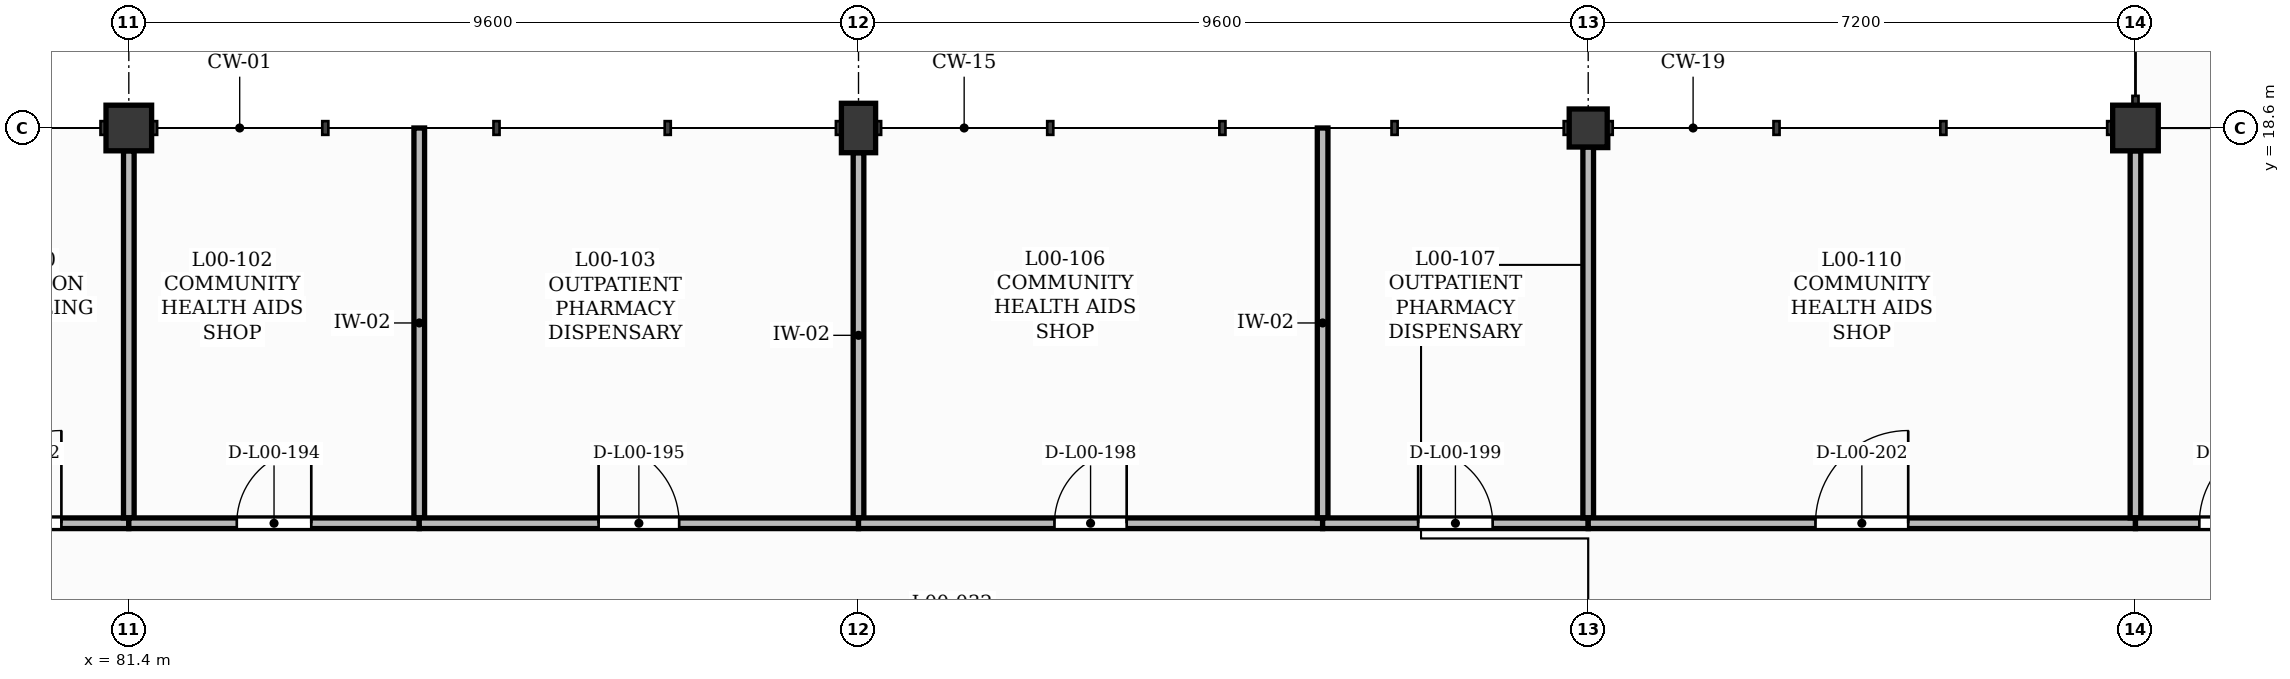
"""IFC4 building model, lengths in metres.
Left out: names, types, materials, properties, quantities, classifications, styles, units other than length and angle.
Written with IfcOpenShell. Run it as: python <this file> out.ifc"""

import sys

from ifc_helpers import new_model, si_unit, direction, frame, frame_2d, origin, origin_2d, place, context, subcontext, project, spatial, rectangle, extrude, element, fill, save


model = new_model("IFC4")
c1 = context("Model", 3, precision=1e-05, world=origin(), true_north=direction((0.0, 1.0)))
c2 = subcontext(c1, "Body", "Model", "MODEL_VIEW")
j1 = project(units=[si_unit("LENGTHUNIT", "METRE"), si_unit("PLANEANGLEUNIT", "RADIAN")], contexts=[c1])
p1 = place(None, origin())
s1 = spatial("IfcSite", under=j1, at=p1, CompositionType="ELEMENT")
p2 = place(p1, origin())
s2 = spatial("IfcBuilding", under=s1, at=p2, CompositionType="ELEMENT")
p3 = place(p2, origin())
s3 = spatial("IfcBuildingStorey", under=s2, at=p3, CompositionType="ELEMENT", Elevation=0.0)
p4 = place(p3, frame((81.4, 18.6, 0.0), z_axis=(0.0, 0.0, 1.0), x_axis=(1.0, 0.0, 0.0)))
e1 = element("IfcColumn", 1, at=p4, inside=s3, PredefinedType="COLUMN", context=c2, shape_type="SweptSolid", body=[
    extrude(rectangle(XDim=0.6, YDim=0.6, at=origin_2d()), origin(), (0.0, 0.0, 1.0), 4.2),
])
p5 = place(p3, frame((91.0, 18.6, 0.0), z_axis=(0.0, 0.0, 1.0), x_axis=(1.0, 0.0, 0.0)))
e2 = element("IfcColumn", 2, at=p5, inside=s3, PredefinedType="COLUMN", context=c2, shape_type="SweptSolid", body=[
    extrude(rectangle(XDim=0.45, YDim=0.65, at=origin_2d()), origin(), (0.0, 0.0, 1.0), 4.2),
])
p6 = place(p3, frame((100.6, 18.6, 0.0), z_axis=(0.0, 0.0, 1.0), x_axis=(1.0, 0.0, 0.0)))
e3 = element("IfcColumn", 3, at=p6, inside=s3, PredefinedType="COLUMN", context=c2, shape_type="SweptSolid", body=[
    extrude(rectangle(XDim=0.5, YDim=0.5, at=origin_2d()), origin(), (0.0, 0.0, 1.0), 4.2),
])
p7 = place(p3, frame((107.8, 18.6, 0.0), z_axis=(0.0, 0.0, 1.0), x_axis=(1.0, 0.0, 0.0)))
e4 = element("IfcColumn", 4, at=p7, inside=s3, PredefinedType="COLUMN", context=c2, shape_type="SweptSolid", body=[
    extrude(rectangle(XDim=0.6, YDim=0.6, at=origin_2d()), origin(), (0.0, 0.0, 1.0), 4.2),
])
p8 = place(p3, frame((78.406, 13.4, 0.0), z_axis=(0.0, 0.0, 1.0), x_axis=(1.0, 0.0, 0.0)))
e5 = element("IfcWall", 5, at=p8, inside=s3, PredefinedType="PARTITIONING", context=c2, shape_type="SweptSolid", body=[
    extrude(rectangle(XDim=2.994, YDim=0.14, at=frame_2d((1.497, 0.0))), origin(), (0.0, 0.0, 1.0), 4.18),
])
p9 = place(p8, frame((0.887, 0.0, 0.0)))
e6 = element("IfcOpeningElement", 6, at=p9, cuts=e5, PredefinedType="OPENING", context=c2, shape_type="SweptSolid", body=[
    extrude(rectangle(XDim=1.22, YDim=2.1, at=frame_2d((0.61, 1.05))), frame((0.0, 0.08, 0.0), z_axis=(0.0, -1.0, 0.0), x_axis=(1.0, 0.0, 0.0)), (0.0, 0.0, 1.0), 0.16),
])
p10 = place(p3, frame((81.4, 13.47, 0.0), z_axis=(0.0, 0.0, 1.0), x_axis=(0.0, 1.0, 0.0)))
e7 = element("IfcWall", 7, at=p10, inside=s3, PredefinedType="PARTITIONING", context=c2, shape_type="SweptSolid", body=[
    extrude(rectangle(XDim=4.83, YDim=0.14, at=frame_2d((2.415, 0.0))), origin(), (0.0, 0.0, 1.0), 3.5),
])
p11 = place(p3, frame((81.4, 13.4, 0.0), z_axis=(0.0, 0.0, 1.0), x_axis=(1.0, 0.0, 0.0)))
e8 = element("IfcWall", 8, at=p11, inside=s3, PredefinedType="PARTITIONING", context=c2, shape_type="SweptSolid", body=[
    extrude(rectangle(XDim=3.821, YDim=0.14, at=frame_2d((1.911, 0.0))), origin(), (0.0, 0.0, 1.0), 4.18),
])
p12 = place(p11, frame((1.42, 0.0, 0.0)))
e9 = element("IfcOpeningElement", 9, at=p12, cuts=e8, PredefinedType="OPENING", context=c2, shape_type="SweptSolid", body=[
    extrude(rectangle(XDim=0.98, YDim=2.15, at=frame_2d((0.49, 1.075))), frame((0.0, 0.08, 0.0), z_axis=(0.0, -1.0, 0.0), x_axis=(1.0, 0.0, 0.0)), (0.0, 0.0, 1.0), 0.16),
])
p13 = place(p3, frame((85.221, 13.47, 0.0), z_axis=(0.0, 0.0, 1.0), x_axis=(0.0, 1.0, 0.0)))
e10 = element("IfcWall", 10, at=p13, inside=s3, PredefinedType="PARTITIONING", context=c2, shape_type="SweptSolid", body=[
    extrude(rectangle(XDim=5.13, YDim=0.14, at=frame_2d((2.565, 0.0))), origin(), (0.0, 0.0, 1.0), 4.18),
])
p14 = place(p3, frame((85.221, 13.4, 0.0), z_axis=(0.0, 0.0, 1.0), x_axis=(1.0, 0.0, 0.0)))
e11 = element("IfcWall", 11, at=p14, inside=s3, PredefinedType="PARTITIONING", context=c2, shape_type="SweptSolid", body=[
    extrude(rectangle(XDim=5.779, YDim=0.14, at=frame_2d((2.89, 0.0))), origin(), (0.0, 0.0, 1.0), 4.18),
])
p15 = place(p14, frame((2.36, 0.0, 0.0)))
e12 = element("IfcOpeningElement", 12, at=p15, cuts=e11, PredefinedType="OPENING", context=c2, shape_type="SweptSolid", body=[
    extrude(rectangle(XDim=1.06, YDim=2.15, at=frame_2d((0.53, 1.075))), frame((0.0, 0.08, 0.0), z_axis=(0.0, -1.0, 0.0), x_axis=(1.0, 0.0, 0.0)), (0.0, 0.0, 1.0), 0.16),
])
p16 = place(p3, frame((91.0, 13.47, 0.0), z_axis=(0.0, 0.0, 1.0), x_axis=(0.0, 1.0, 0.0)))
e13 = element("IfcWall", 13, at=p16, inside=s3, PredefinedType="PARTITIONING", context=c2, shape_type="SweptSolid", body=[
    extrude(rectangle(XDim=4.805, YDim=0.14, at=frame_2d((2.402, 0.0))), origin(), (0.0, 0.0, 1.0), 3.5),
])
p17 = place(p3, frame((91.0, 13.4, 0.0), z_axis=(0.0, 0.0, 1.0), x_axis=(1.0, 0.0, 0.0)))
e14 = element("IfcWall", 14, at=p17, inside=s3, PredefinedType="PARTITIONING", context=c2, shape_type="SweptSolid", body=[
    extrude(rectangle(XDim=6.106, YDim=0.14, at=frame_2d((3.053, 0.0))), origin(), (0.0, 0.0, 1.0), 4.18),
])
p18 = place(p17, frame((2.578, 0.0, 0.0)))
e15 = element("IfcOpeningElement", 15, at=p18, cuts=e14, PredefinedType="OPENING", context=c2, shape_type="SweptSolid", body=[
    extrude(rectangle(XDim=0.95, YDim=2.1, at=frame_2d((0.475, 1.05))), frame((0.0, 0.08, 0.0), z_axis=(0.0, -1.0, 0.0), x_axis=(1.0, 0.0, 0.0)), (0.0, 0.0, 1.0), 0.16),
])
p19 = place(p3, frame((97.106, 13.47, 0.0), z_axis=(0.0, 0.0, 1.0), x_axis=(0.0, 1.0, 0.0)))
e16 = element("IfcWall", 16, at=p19, inside=s3, PredefinedType="PARTITIONING", context=c2, shape_type="SweptSolid", body=[
    extrude(rectangle(XDim=5.13, YDim=0.14, at=frame_2d((2.565, 0.0))), origin(), (0.0, 0.0, 1.0), 4.18),
])
p20 = place(p3, frame((97.106, 13.4, 0.0), z_axis=(0.0, 0.0, 1.0), x_axis=(1.0, 0.0, 0.0)))
e17 = element("IfcWall", 17, at=p20, inside=s3, PredefinedType="PARTITIONING", context=c2, shape_type="SweptSolid", body=[
    extrude(rectangle(XDim=3.494, YDim=0.14, at=frame_2d((1.747, 0.0))), origin(), (0.0, 0.0, 1.0), 4.18),
])
p21 = place(p20, frame((1.257, 0.0, 0.0)))
e18 = element("IfcOpeningElement", 18, at=p21, cuts=e17, PredefinedType="OPENING", context=c2, shape_type="SweptSolid", body=[
    extrude(rectangle(XDim=0.98, YDim=2.15, at=frame_2d((0.49, 1.075))), frame((0.0, 0.08, 0.0), z_axis=(0.0, -1.0, 0.0), x_axis=(1.0, 0.0, 0.0)), (0.0, 0.0, 1.0), 0.16),
])
p22 = place(p3, frame((100.6, 13.47, 0.0), z_axis=(0.0, 0.0, 1.0), x_axis=(0.0, 1.0, 0.0)))
e19 = element("IfcWall", 19, at=p22, inside=s3, PredefinedType="PARTITIONING", context=c2, shape_type="SweptSolid", body=[
    extrude(rectangle(XDim=4.88, YDim=0.14, at=frame_2d((2.44, 0.0))), origin(), (0.0, 0.0, 1.0), 3.5),
])
p23 = place(p3, frame((100.6, 13.4, 0.0), z_axis=(0.0, 0.0, 1.0), x_axis=(1.0, 0.0, 0.0)))
e20 = element("IfcWall", 20, at=p23, inside=s3, PredefinedType="PARTITIONING", context=c2, shape_type="SweptSolid", body=[
    extrude(rectangle(XDim=7.2, YDim=0.14, at=frame_2d((3.6, 0.0))), origin(), (0.0, 0.0, 1.0), 4.18),
])
p24 = place(p23, frame((2.99, 0.0, 0.0)))
e21 = element("IfcOpeningElement", 21, at=p24, cuts=e20, PredefinedType="OPENING", context=c2, shape_type="SweptSolid", body=[
    extrude(rectangle(XDim=1.22, YDim=2.1, at=frame_2d((0.61, 1.05))), frame((0.0, 0.08, 0.0), z_axis=(0.0, -1.0, 0.0), x_axis=(1.0, 0.0, 0.0)), (0.0, 0.0, 1.0), 0.16),
])
p25 = place(p3, frame((107.8, 13.47, 0.0), z_axis=(0.0, 0.0, 1.0), x_axis=(0.0, 1.0, 0.0)))
e22 = element("IfcWall", 22, at=p25, inside=s3, PredefinedType="PARTITIONING", context=c2, shape_type="SweptSolid", body=[
    extrude(rectangle(XDim=4.83, YDim=0.14, at=frame_2d((2.415, 0.0))), origin(), (0.0, 0.0, 1.0), 3.5),
])
p26 = place(p3, frame((107.8, 13.4, 0.0), z_axis=(0.0, 0.0, 1.0), x_axis=(1.0, 0.0, 0.0)))
e23 = element("IfcWall", 23, at=p26, inside=s3, PredefinedType="PARTITIONING", context=c2, shape_type="SweptSolid", body=[
    extrude(rectangle(XDim=2.8, YDim=0.14, at=frame_2d((1.4, 0.0))), origin(), (0.0, 0.0, 1.0), 4.18),
])
p27 = place(p26, frame((0.84, 0.0, 0.0)))
e24 = element("IfcOpeningElement", 24, at=p27, cuts=e23, PredefinedType="OPENING", context=c2, shape_type="SweptSolid", body=[
    extrude(rectangle(XDim=1.12, YDim=2.15, at=frame_2d((0.56, 1.075))), frame((0.0, 0.08, 0.0), z_axis=(0.0, -1.0, 0.0), x_axis=(1.0, 0.0, 0.0)), (0.0, 0.0, 1.0), 0.16),
])
p28 = place(p27, origin())
e25 = element("IfcDoor", 25, at=p28, inside=s3, OperationType="SINGLE_SWING_RIGHT", PredefinedType="DOOR", context=c2, shape_type="SweptSolid", body=[
    extrude(rectangle(XDim=1.12, YDim=2.15, at=frame_2d((0.56, 1.075))), frame((0.0, 0.025, 0.0), z_axis=(0.0, -1.0, 0.0), x_axis=(1.0, 0.0, 0.0)), (0.0, 0.0, 1.0), 0.05),
])
fill(e24, e25)
p29 = place(p9, origin())
e26 = element("IfcDoor", 26, at=p29, inside=s3, OperationType="SINGLE_SWING_RIGHT", PredefinedType="DOOR", context=c2, shape_type="SweptSolid", body=[
    extrude(rectangle(XDim=1.22, YDim=2.1, at=frame_2d((0.61, 1.05))), frame((0.0, 0.025, 0.0), z_axis=(0.0, -1.0, 0.0), x_axis=(1.0, 0.0, 0.0)), (0.0, 0.0, 1.0), 0.05),
])
fill(e6, e26)
p30 = place(p12, origin())
e27 = element("IfcDoor", 27, at=p30, inside=s3, OperationType="SINGLE_SWING_RIGHT", PredefinedType="DOOR", context=c2, shape_type="SweptSolid", body=[
    extrude(rectangle(XDim=0.98, YDim=2.15, at=frame_2d((0.49, 1.075))), frame((0.0, 0.025, 0.0), z_axis=(0.0, -1.0, 0.0), x_axis=(1.0, 0.0, 0.0)), (0.0, 0.0, 1.0), 0.05),
])
fill(e9, e27)
p31 = place(p15, origin())
e28 = element("IfcDoor", 28, at=p31, inside=s3, OperationType="SINGLE_SWING_LEFT", PredefinedType="DOOR", context=c2, shape_type="SweptSolid", body=[
    extrude(rectangle(XDim=1.06, YDim=2.15, at=frame_2d((0.53, 1.075))), frame((0.0, 0.025, 0.0), z_axis=(0.0, -1.0, 0.0), x_axis=(1.0, 0.0, 0.0)), (0.0, 0.0, 1.0), 0.05),
])
fill(e12, e28)
p32 = place(p18, origin())
e29 = element("IfcDoor", 29, at=p32, inside=s3, OperationType="SINGLE_SWING_RIGHT", PredefinedType="DOOR", context=c2, shape_type="SweptSolid", body=[
    extrude(rectangle(XDim=0.95, YDim=2.1, at=frame_2d((0.475, 1.05))), frame((0.0, 0.025, 0.0), z_axis=(0.0, -1.0, 0.0), x_axis=(1.0, 0.0, 0.0)), (0.0, 0.0, 1.0), 0.05),
])
fill(e15, e29)
p33 = place(p21, origin())
e30 = element("IfcDoor", 30, at=p33, inside=s3, OperationType="SINGLE_SWING_LEFT", PredefinedType="DOOR", context=c2, shape_type="SweptSolid", body=[
    extrude(rectangle(XDim=0.98, YDim=2.15, at=frame_2d((0.49, 1.075))), frame((0.0, 0.025, 0.0), z_axis=(0.0, -1.0, 0.0), x_axis=(1.0, 0.0, 0.0)), (0.0, 0.0, 1.0), 0.05),
])
fill(e18, e30)
p34 = place(p24, origin())
e31 = element("IfcDoor", 31, at=p34, inside=s3, OperationType="SINGLE_SWING_RIGHT", PredefinedType="DOOR", context=c2, shape_type="SweptSolid", body=[
    extrude(rectangle(XDim=1.22, YDim=2.1, at=frame_2d((0.61, 1.05))), frame((0.0, 0.025, 0.0), z_axis=(0.0, -1.0, 0.0), x_axis=(1.0, 0.0, 0.0)), (0.0, 0.0, 1.0), 0.05),
])
fill(e21, e31)
save(model, sys.argv[1])
